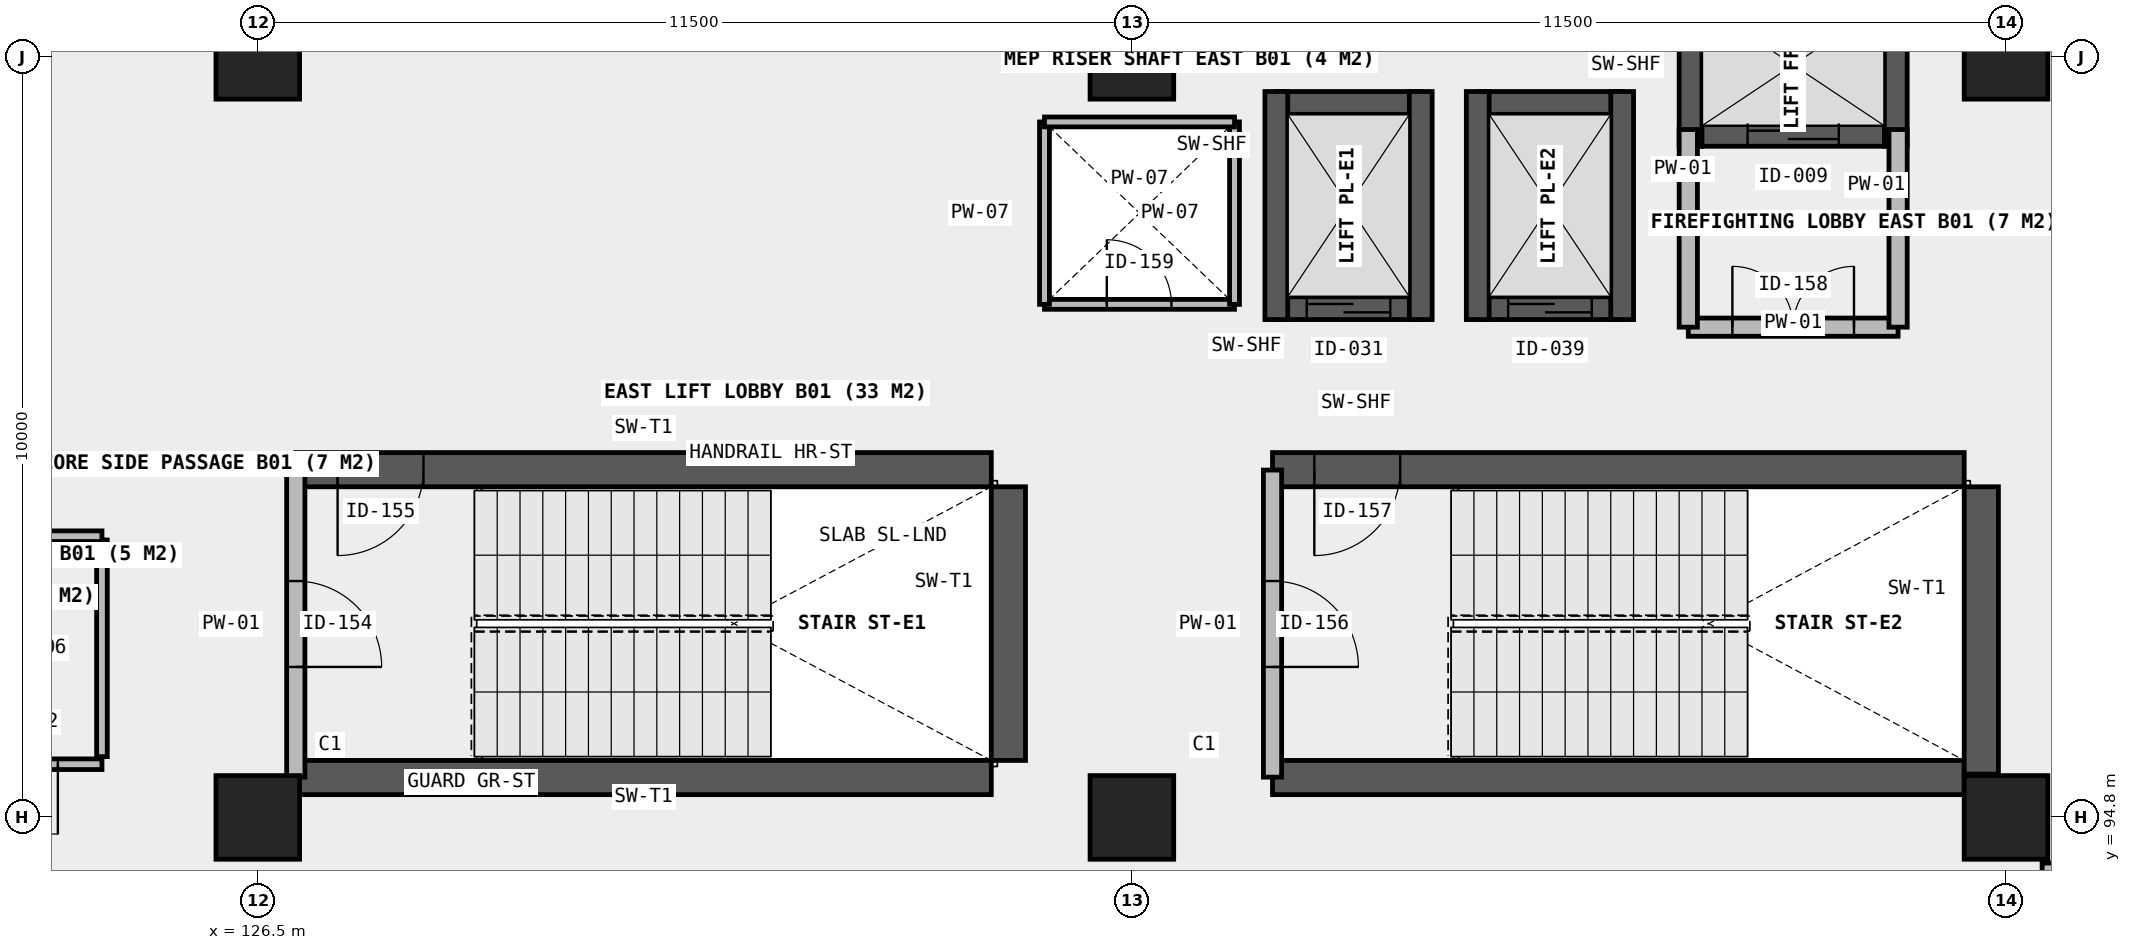
"""IFC4 building model, lengths in metres.
Left out: names, types, materials, properties, quantities, classifications, styles, units other than length and angle.
Written with IfcOpenShell. Run it as: python <this file> out.ifc"""

import sys

from ifc_helpers import new_model, si_unit, direction, frame, frame_2d, origin, origin_2d, place, context, subcontext, project, spatial, rectangle, extrude, element, fill, save


model = new_model("IFC4")
c1 = context("Model", 3, precision=1e-05, world=origin(), true_north=direction((0.0, 1.0)))
c2 = subcontext(c1, "Body", "Model", "MODEL_VIEW")
j1 = project(units=[si_unit("LENGTHUNIT", "METRE"), si_unit("PLANEANGLEUNIT", "RADIAN")], contexts=[c1])
p1 = place(None, origin())
s1 = spatial("IfcSite", under=j1, at=p1, CompositionType="ELEMENT")
p2 = place(p1, origin())
s2 = spatial("IfcBuilding", under=s1, at=p2, CompositionType="ELEMENT")
p3 = place(p2, frame((0.0, 0.0, -4.2)))
s3 = spatial("IfcBuildingStorey", under=s2, at=p3, CompositionType="ELEMENT", Elevation=-4.2)
for number, where, z_axis, x_axis in (
    (1, (126.5, 94.8, 0.0), (0.0, 0.0, 1.0), (1.0, 0.0, 0.0)),
    (2, (126.5, 104.8, 0.0), (0.0, 0.0, 1.0), (1.0, 0.0, 0.0)),
    (3, (138.0, 94.8, 0.0), (0.0, 0.0, 1.0), (1.0, 0.0, 0.0)),
    (4, (138.0, 104.8, 0.0), (0.0, 0.0, 1.0), (1.0, 0.0, 0.0)),
    (5, (149.5, 94.8, 0.0), (0.0, 0.0, 1.0), (1.0, 0.0, 0.0)),
    (6, (149.5, 104.8, 0.0), (0.0, 0.0, 1.0), (1.0, 0.0, 0.0)),
):
    element("IfcColumn", number, at=place(p3, frame(where, z_axis=z_axis, x_axis=x_axis)), inside=s3, PredefinedType="COLUMN", context=c2, shape_type="SweptSolid", body=[
        extrude(rectangle(XDim=1.1, YDim=1.1, at=origin_2d()), origin(), (0.0, 0.0, 1.0), 4.2),
    ])
p4 = place(p3, frame((145.35, 103.78, 0.0), z_axis=(0.0, 0.0, 1.0), x_axis=(1.0, 0.0, 0.0)))
e7 = element("IfcWall", 7, at=p4, inside=s3, PredefinedType="SHEAR", context=c2, shape_type="SweptSolid", body=[
    extrude(rectangle(XDim=2.7, YDim=0.3, at=frame_2d((1.35, 0.0))), origin(), (0.0, 0.0, 1.0), 4.2),
])
p5 = place(p4, frame((0.75, 0.0, 0.0)))
e8 = element("IfcOpeningElement", 8, at=p5, cuts=e7, PredefinedType="OPENING", context=c2, shape_type="SweptSolid", body=[
    extrude(rectangle(XDim=1.2, YDim=2.15, at=frame_2d((0.6, 1.075))), frame((0.0, 0.16, 0.0), z_axis=(0.0, -1.0, 0.0), x_axis=(1.0, 0.0, 0.0)), (0.0, 0.0, 1.0), 0.32),
])
for number, where, z_axis, x_axis in (
    (9, (145.35, 103.63, 0.0), (0.0, 0.0, 1.0), (0.0, 1.0, 0.0)),
    (10, (148.05, 103.63, 0.0), (0.0, 0.0, 1.0), (0.0, 1.0, 0.0)),
):
    element("IfcWall", number, at=place(p3, frame(where, z_axis=z_axis, x_axis=x_axis)), inside=s3, PredefinedType="SHEAR", context=c2, shape_type="SweptSolid", body=[
        extrude(rectangle(XDim=2.14, YDim=0.3, at=frame_2d((1.07, 0.0))), origin(), (0.0, 0.0, 1.0), 4.2),
    ])
p6 = place(p3, frame((139.9, 101.5, 0.0), z_axis=(0.0, 0.0, 1.0), x_axis=(1.0, 0.0, 0.0)))
e11 = element("IfcWall", 11, at=p6, inside=s3, PredefinedType="SHEAR", context=c2, shape_type="SweptSolid", body=[
    extrude(rectangle(XDim=1.9, YDim=0.3, at=frame_2d((0.95, 0.0))), origin(), (0.0, 0.0, 1.0), 4.2),
])
p7 = place(p6, frame((0.4, 0.0, 0.0)))
e12 = element("IfcOpeningElement", 12, at=p7, cuts=e11, PredefinedType="OPENING", context=c2, shape_type="SweptSolid", body=[
    extrude(rectangle(XDim=1.1, YDim=2.15, at=frame_2d((0.55, 1.075))), frame((0.0, 0.16, 0.0), z_axis=(0.0, -1.0, 0.0), x_axis=(1.0, 0.0, 0.0)), (0.0, 0.0, 1.0), 0.32),
])
p8 = place(p3, frame((139.9, 104.2, 0.0), z_axis=(0.0, 0.0, 1.0), x_axis=(1.0, 0.0, 0.0)))
e13 = element("IfcWall", 13, at=p8, inside=s3, PredefinedType="SHEAR", context=c2, shape_type="SweptSolid", body=[
    extrude(rectangle(XDim=1.9, YDim=0.3, at=frame_2d((0.95, 0.0))), origin(), (0.0, 0.0, 1.0), 4.2),
])
for number, where, z_axis, x_axis in (
    (14, (139.9, 101.35, 0.0), (0.0, 0.0, 1.0), (0.0, 1.0, 0.0)),
    (15, (141.8, 101.35, 0.0), (0.0, 0.0, 1.0), (0.0, 1.0, 0.0)),
):
    element("IfcWall", number, at=place(p3, frame(where, z_axis=z_axis, x_axis=x_axis)), inside=s3, PredefinedType="SHEAR", context=c2, shape_type="SweptSolid", body=[
        extrude(rectangle(XDim=3.0, YDim=0.3, at=frame_2d((1.5, 0.0))), origin(), (0.0, 0.0, 1.0), 4.2),
    ])
p9 = place(p3, frame((142.55, 101.5, 0.0), z_axis=(0.0, 0.0, 1.0), x_axis=(1.0, 0.0, 0.0)))
e16 = element("IfcWall", 16, at=p9, inside=s3, PredefinedType="SHEAR", context=c2, shape_type="SweptSolid", body=[
    extrude(rectangle(XDim=1.9, YDim=0.3, at=frame_2d((0.95, 0.0))), origin(), (0.0, 0.0, 1.0), 4.2),
])
p10 = place(p9, frame((0.4, 0.0, 0.0)))
e17 = element("IfcOpeningElement", 17, at=p10, cuts=e16, PredefinedType="OPENING", context=c2, shape_type="SweptSolid", body=[
    extrude(rectangle(XDim=1.1, YDim=2.15, at=frame_2d((0.55, 1.075))), frame((0.0, 0.16, 0.0), z_axis=(0.0, -1.0, 0.0), x_axis=(1.0, 0.0, 0.0)), (0.0, 0.0, 1.0), 0.32),
])
p11 = place(p3, frame((142.55, 104.2, 0.0), z_axis=(0.0, 0.0, 1.0), x_axis=(1.0, 0.0, 0.0)))
e18 = element("IfcWall", 18, at=p11, inside=s3, PredefinedType="SHEAR", context=c2, shape_type="SweptSolid", body=[
    extrude(rectangle(XDim=1.9, YDim=0.3, at=frame_2d((0.95, 0.0))), origin(), (0.0, 0.0, 1.0), 4.2),
])
for number, where, z_axis, x_axis in (
    (19, (142.55, 101.35, 0.0), (0.0, 0.0, 1.0), (0.0, 1.0, 0.0)),
    (20, (144.45, 101.35, 0.0), (0.0, 0.0, 1.0), (0.0, 1.0, 0.0)),
):
    element("IfcWall", number, at=place(p3, frame(where, z_axis=z_axis, x_axis=x_axis)), inside=s3, PredefinedType="SHEAR", context=c2, shape_type="SweptSolid", body=[
        extrude(rectangle(XDim=3.0, YDim=0.3, at=frame_2d((1.5, 0.0))), origin(), (0.0, 0.0, 1.0), 4.2),
    ])
p12 = place(p3, frame((127.0, 95.325, 0.0), z_axis=(0.0, 0.0, 1.0), x_axis=(1.0, 0.0, 0.0)))
e21 = element("IfcWall", 21, at=p12, inside=s3, PredefinedType="SHEAR", context=c2, shape_type="SweptSolid", body=[
    extrude(rectangle(XDim=9.15, YDim=0.45, at=frame_2d((4.575, 0.0))), origin(), (0.0, 0.0, 1.0), 4.2),
])
p13 = place(p3, frame((127.0, 99.375, 0.0), z_axis=(0.0, 0.0, 1.0), x_axis=(1.0, 0.0, 0.0)))
e22 = element("IfcWall", 22, at=p13, inside=s3, PredefinedType="SHEAR", context=c2, shape_type="SweptSolid", body=[
    extrude(rectangle(XDim=9.15, YDim=0.45, at=frame_2d((4.575, 0.0))), origin(), (0.0, 0.0, 1.0), 4.2),
])
p14 = place(p13, frame((0.55, 0.0, 0.0)))
e23 = element("IfcOpeningElement", 23, at=p14, cuts=e22, PredefinedType="OPENING", context=c2, shape_type="SweptSolid", body=[
    extrude(rectangle(XDim=1.13, YDim=2.15, at=frame_2d((0.565, 1.075))), frame((0.0, 0.235, 0.0), z_axis=(0.0, -1.0, 0.0), x_axis=(1.0, 0.0, 0.0)), (0.0, 0.0, 1.0), 0.47),
])
p15 = place(p3, frame((136.375, 95.55, 0.0), z_axis=(0.0, 0.0, 1.0), x_axis=(0.0, 1.0, 0.0)))
e24 = element("IfcWall", 24, at=p15, inside=s3, PredefinedType="SHEAR", context=c2, shape_type="SweptSolid", body=[
    extrude(rectangle(XDim=3.6, YDim=0.45, at=frame_2d((1.8, 0.0))), origin(), (0.0, 0.0, 1.0), 4.2),
])
p16 = place(p3, frame((139.85, 95.325, 0.0), z_axis=(0.0, 0.0, 1.0), x_axis=(1.0, 0.0, 0.0)))
e25 = element("IfcWall", 25, at=p16, inside=s3, PredefinedType="SHEAR", context=c2, shape_type="SweptSolid", body=[
    extrude(rectangle(XDim=9.1, YDim=0.45, at=frame_2d((4.55, 0.0))), origin(), (0.0, 0.0, 1.0), 4.2),
])
p17 = place(p3, frame((139.85, 99.375, 0.0), z_axis=(0.0, 0.0, 1.0), x_axis=(1.0, 0.0, 0.0)))
e26 = element("IfcWall", 26, at=p17, inside=s3, PredefinedType="SHEAR", context=c2, shape_type="SweptSolid", body=[
    extrude(rectangle(XDim=9.1, YDim=0.45, at=frame_2d((4.55, 0.0))), origin(), (0.0, 0.0, 1.0), 4.2),
])
p18 = place(p17, frame((0.55, 0.0, 0.0)))
e27 = element("IfcOpeningElement", 27, at=p18, cuts=e26, PredefinedType="OPENING", context=c2, shape_type="SweptSolid", body=[
    extrude(rectangle(XDim=1.13, YDim=2.15, at=frame_2d((0.565, 1.075))), frame((0.0, 0.235, 0.0), z_axis=(0.0, -1.0, 0.0), x_axis=(1.0, 0.0, 0.0)), (0.0, 0.0, 1.0), 0.47),
])
p19 = place(p3, frame((149.175, 95.37, 0.0), z_axis=(0.0, 0.0, 1.0), x_axis=(0.0, 1.0, 0.0)))
e28 = element("IfcWall", 28, at=p19, inside=s3, PredefinedType="SHEAR", context=c2, shape_type="SweptSolid", body=[
    extrude(rectangle(XDim=3.78, YDim=0.45, at=frame_2d((1.89, 0.0))), origin(), (0.0, 0.0, 1.0), 4.2),
])
p20 = place(p3, frame((127.0, 95.33, 0.0), z_axis=(0.0, 0.0, 1.0), x_axis=(0.0, 1.0, 0.0)))
e29 = element("IfcWall", 29, at=p20, inside=s3, PredefinedType="SOLIDWALL", context=c2, shape_type="SweptSolid", body=[
    extrude(rectangle(XDim=4.04, YDim=0.24, at=frame_2d((2.02, 0.0))), origin(), (0.0, 0.0, 1.0), 3.86),
])
p21 = place(p20, frame((1.45, 0.0, 0.0)))
e30 = element("IfcOpeningElement", 30, at=p21, cuts=e29, PredefinedType="OPENING", context=c2, shape_type="SweptSolid", body=[
    extrude(rectangle(XDim=1.13, YDim=2.15, at=frame_2d((0.565, 1.075))), frame((0.0, 0.13, 0.0), z_axis=(0.0, -1.0, 0.0), x_axis=(1.0, 0.0, 0.0)), (0.0, 0.0, 1.0), 0.26),
])
p22 = place(p3, frame((139.85, 95.33, 0.0), z_axis=(0.0, 0.0, 1.0), x_axis=(0.0, 1.0, 0.0)))
e31 = element("IfcWall", 31, at=p22, inside=s3, PredefinedType="SOLIDWALL", context=c2, shape_type="SweptSolid", body=[
    extrude(rectangle(XDim=4.04, YDim=0.24, at=frame_2d((2.02, 0.0))), origin(), (0.0, 0.0, 1.0), 3.86),
])
p23 = place(p22, frame((1.45, 0.0, 0.0)))
e32 = element("IfcOpeningElement", 32, at=p23, cuts=e31, PredefinedType="OPENING", context=c2, shape_type="SweptSolid", body=[
    extrude(rectangle(XDim=1.13, YDim=2.15, at=frame_2d((0.565, 1.075))), frame((0.0, 0.13, 0.0), z_axis=(0.0, -1.0, 0.0), x_axis=(1.0, 0.0, 0.0)), (0.0, 0.0, 1.0), 0.26),
])
p24 = place(p3, frame((145.32, 101.25, 0.0), z_axis=(0.0, 0.0, 1.0), x_axis=(1.0, 0.0, 0.0)))
e33 = element("IfcWall", 33, at=p24, inside=s3, PredefinedType="SOLIDWALL", context=c2, shape_type="SweptSolid", body=[
    extrude(rectangle(XDim=2.76, YDim=0.24, at=frame_2d((1.38, 0.0))), origin(), (0.0, 0.0, 1.0), 3.86),
])
p25 = place(p24, frame((0.58, 0.0, 0.0)))
e34 = element("IfcOpeningElement", 34, at=p25, cuts=e33, PredefinedType="OPENING", context=c2, shape_type="SweptSolid", body=[
    extrude(rectangle(XDim=1.6, YDim=2.15, at=frame_2d((0.8, 1.075))), frame((0.0, 0.13, 0.0), z_axis=(0.0, -1.0, 0.0), x_axis=(1.0, 0.0, 0.0)), (0.0, 0.0, 1.0), 0.26),
])
for number, where, z_axis, x_axis in (
    (35, (145.32, 101.25, 0.0), (0.0, 0.0, 1.0), (0.0, 1.0, 0.0)),
    (36, (148.08, 101.25, 0.0), (0.0, 0.0, 1.0), (0.0, 1.0, 0.0)),
):
    element("IfcWall", number, at=place(p3, frame(where, z_axis=z_axis, x_axis=x_axis)), inside=s3, PredefinedType="SOLIDWALL", context=c2, shape_type="SweptSolid", body=[
        extrude(rectangle(XDim=2.6, YDim=0.24, at=frame_2d((1.3, 0.0))), origin(), (0.0, 0.0, 1.0), 3.86),
    ])
p26 = place(p3, frame((136.85, 101.55, 0.0), z_axis=(0.0, 0.0, 1.0), x_axis=(1.0, 0.0, 0.0)))
e37 = element("IfcWall", 37, at=p26, inside=s3, PredefinedType="PLUMBINGWALL", context=c2, shape_type="SweptSolid", body=[
    extrude(rectangle(XDim=2.5, YDim=0.13, at=frame_2d((1.25, 0.0))), origin(), (0.0, 0.0, 1.0), 3.86),
])
p27 = place(p26, frame((0.82, 0.0, 0.0)))
e38 = element("IfcOpeningElement", 38, at=p27, cuts=e37, PredefinedType="OPENING", context=c2, shape_type="SweptSolid", body=[
    extrude(rectangle(XDim=0.85, YDim=2.0, at=frame_2d((0.425, 1.0))), frame((0.0, 0.075, 0.0), z_axis=(0.0, -1.0, 0.0), x_axis=(1.0, 0.0, 0.0)), (0.0, 0.0, 1.0), 0.15),
])
for number, where, z_axis, x_axis in (
    (39, (136.85, 101.55, 0.0), (0.0, 0.0, 1.0), (0.0, 1.0, 0.0)),
    (40, (139.35, 101.55, 0.0), (0.0, 0.0, 1.0), (0.0, 1.0, 0.0)),
):
    element("IfcWall", number, at=place(p3, frame(where, z_axis=z_axis, x_axis=x_axis)), inside=s3, PredefinedType="PLUMBINGWALL", context=c2, shape_type="SweptSolid", body=[
        extrude(rectangle(XDim=2.4, YDim=0.13, at=frame_2d((1.2, 0.0))), origin(), (0.0, 0.0, 1.0), 3.86),
    ])
p28 = place(p3, frame((136.85, 103.95, 0.0), z_axis=(0.0, 0.0, 1.0), x_axis=(1.0, 0.0, 0.0)))
e41 = element("IfcWall", 41, at=p28, inside=s3, PredefinedType="PLUMBINGWALL", context=c2, shape_type="SweptSolid", body=[
    extrude(rectangle(XDim=2.5, YDim=0.13, at=frame_2d((1.25, 0.0))), origin(), (0.0, 0.0, 1.0), 3.86),
])
p29 = place(p3, frame((118.15, 95.5, 0.0), z_axis=(0.0, 0.0, 1.0), x_axis=(1.0, 0.0, 0.0)))
e42 = element("IfcWall", 42, at=p29, inside=s3, PredefinedType="PLUMBINGWALL", context=c2, shape_type="SweptSolid", body=[
    extrude(rectangle(XDim=6.3, YDim=0.14, at=frame_2d((3.15, 0.0))), origin(), (0.0, 0.0, 1.0), 3.86),
])
p30 = place(p29, frame((0.72, 0.0, 0.0)))
e43 = element("IfcOpeningElement", 43, at=p30, cuts=e42, PredefinedType="OPENING", context=c2, shape_type="SweptSolid", body=[
    extrude(rectangle(XDim=0.95, YDim=2.1, at=frame_2d((0.475, 1.05))), frame((0.0, 0.08, 0.0), z_axis=(0.0, -1.0, 0.0), x_axis=(1.0, 0.0, 0.0)), (0.0, 0.0, 1.0), 0.16),
])
p31 = place(p29, frame((2.8, 0.0, 0.0)))
e44 = element("IfcOpeningElement", 44, at=p31, cuts=e42, PredefinedType="OPENING", context=c2, shape_type="SweptSolid", body=[
    extrude(rectangle(XDim=0.92, YDim=2.1, at=frame_2d((0.46, 1.05))), frame((0.0, 0.08, 0.0), z_axis=(0.0, -1.0, 0.0), x_axis=(1.0, 0.0, 0.0)), (0.0, 0.0, 1.0), 0.16),
])
p32 = place(p29, frame((4.8, 0.0, 0.0)))
e45 = element("IfcOpeningElement", 45, at=p32, cuts=e42, PredefinedType="OPENING", context=c2, shape_type="SweptSolid", body=[
    extrude(rectangle(XDim=0.92, YDim=2.1, at=frame_2d((0.46, 1.05))), frame((0.0, 0.08, 0.0), z_axis=(0.0, -1.0, 0.0), x_axis=(1.0, 0.0, 0.0)), (0.0, 0.0, 1.0), 0.16),
])
p33 = place(p3, frame((124.45, 95.6, 0.0), z_axis=(0.0, 0.0, 1.0), x_axis=(0.0, 1.0, 0.0)))
e46 = element("IfcWall", 46, at=p33, inside=s3, PredefinedType="PLUMBINGWALL", context=c2, shape_type="SweptSolid", body=[
    extrude(rectangle(XDim=2.85, YDim=0.14, at=frame_2d((1.425, 0.0))), origin(), (0.0, 0.0, 1.0), 3.86),
])
p34 = place(p3, frame((118.15, 98.5, 0.0), z_axis=(0.0, 0.0, 1.0), x_axis=(1.0, 0.0, 0.0)))
e47 = element("IfcWall", 47, at=p34, inside=s3, PredefinedType="PLUMBINGWALL", context=c2, shape_type="SweptSolid", body=[
    extrude(rectangle(XDim=6.3, YDim=0.14, at=frame_2d((3.15, 0.0))), origin(), (0.0, 0.0, 1.0), 3.86),
])
p35 = place(p3, frame((150.1, 86.2, 0.0), z_axis=(0.0, 0.0, 1.0), x_axis=(0.0, 1.0, 0.0)))
e48 = element("IfcWall", 48, at=p35, inside=s3, PredefinedType="SOLIDWALL", context=c2, shape_type="SweptSolid", body=[
    extrude(rectangle(XDim=8.0, YDim=0.25, at=frame_2d((4.0, 0.0))), origin(), (0.0, 0.0, 1.0), 3.86),
])
p36 = place(p35, frame((2.8, 0.0, 0.0)))
e49 = element("IfcOpeningElement", 49, at=p36, cuts=e48, PredefinedType="OPENING", context=c2, shape_type="SweptSolid", body=[
    extrude(rectangle(XDim=1.7, YDim=2.25, at=frame_2d((0.85, 1.125))), frame((0.0, 0.135, 0.0), z_axis=(0.0, -1.0, 0.0), x_axis=(1.0, 0.0, 0.0)), (0.0, 0.0, 1.0), 0.27),
])
p37 = place(p5, origin())
e50 = element("IfcDoor", 50, at=p37, inside=s3, OperationType="SLIDING_TO_RIGHT", PredefinedType="DOOR", context=c2, shape_type="SweptSolid", body=[
    extrude(rectangle(XDim=1.2, YDim=2.15, at=frame_2d((0.6, 1.075))), frame((0.0, 0.025, 0.0), z_axis=(0.0, -1.0, 0.0), x_axis=(1.0, 0.0, 0.0)), (0.0, 0.0, 1.0), 0.05),
])
fill(e8, e50)
p38 = place(p7, origin())
e51 = element("IfcDoor", 51, at=p38, inside=s3, OperationType="SLIDING_TO_LEFT", PredefinedType="DOOR", context=c2, shape_type="SweptSolid", body=[
    extrude(rectangle(XDim=1.1, YDim=2.15, at=frame_2d((0.55, 1.075))), frame((0.0, 0.025, 0.0), z_axis=(0.0, -1.0, 0.0), x_axis=(1.0, 0.0, 0.0)), (0.0, 0.0, 1.0), 0.05),
])
fill(e12, e51)
p39 = place(p10, origin())
e52 = element("IfcDoor", 52, at=p39, inside=s3, OperationType="SLIDING_TO_LEFT", PredefinedType="DOOR", context=c2, shape_type="SweptSolid", body=[
    extrude(rectangle(XDim=1.1, YDim=2.15, at=frame_2d((0.55, 1.075))), frame((0.0, 0.025, 0.0), z_axis=(0.0, -1.0, 0.0), x_axis=(1.0, 0.0, 0.0)), (0.0, 0.0, 1.0), 0.05),
])
fill(e17, e52)
p40 = place(p21, frame((0.565, 0.0, 0.0), z_axis=(0.0, 0.0, 1.0), x_axis=(-1.0, 0.0, 0.0)))
e53 = element("IfcDoor", 53, at=p40, inside=s3, OperationType="SINGLE_SWING_LEFT", PredefinedType="DOOR", context=c2, shape_type="SweptSolid", body=[
    extrude(rectangle(XDim=1.13, YDim=2.15, at=frame_2d((0.0, 1.075))), frame((0.0, 0.025, 0.0), z_axis=(0.0, -1.0, 0.0), x_axis=(1.0, 0.0, 0.0)), (0.0, 0.0, 1.0), 0.05),
])
fill(e30, e53)
p41 = place(p14, frame((0.565, 0.0, 0.0), z_axis=(0.0, 0.0, 1.0), x_axis=(-1.0, 0.0, 0.0)))
e54 = element("IfcDoor", 54, at=p41, inside=s3, OperationType="SINGLE_SWING_LEFT", PredefinedType="DOOR", context=c2, shape_type="SweptSolid", body=[
    extrude(rectangle(XDim=1.13, YDim=2.15, at=frame_2d((0.0, 1.075))), frame((0.0, 0.025, 0.0), z_axis=(0.0, -1.0, 0.0), x_axis=(1.0, 0.0, 0.0)), (0.0, 0.0, 1.0), 0.05),
])
fill(e23, e54)
p42 = place(p23, frame((0.565, 0.0, 0.0), z_axis=(0.0, 0.0, 1.0), x_axis=(-1.0, 0.0, 0.0)))
e55 = element("IfcDoor", 55, at=p42, inside=s3, OperationType="SINGLE_SWING_LEFT", PredefinedType="DOOR", context=c2, shape_type="SweptSolid", body=[
    extrude(rectangle(XDim=1.13, YDim=2.15, at=frame_2d((0.0, 1.075))), frame((0.0, 0.025, 0.0), z_axis=(0.0, -1.0, 0.0), x_axis=(1.0, 0.0, 0.0)), (0.0, 0.0, 1.0), 0.05),
])
fill(e32, e55)
p43 = place(p18, frame((0.565, 0.0, 0.0), z_axis=(0.0, 0.0, 1.0), x_axis=(-1.0, 0.0, 0.0)))
e56 = element("IfcDoor", 56, at=p43, inside=s3, OperationType="SINGLE_SWING_LEFT", PredefinedType="DOOR", context=c2, shape_type="SweptSolid", body=[
    extrude(rectangle(XDim=1.13, YDim=2.15, at=frame_2d((0.0, 1.075))), frame((0.0, 0.025, 0.0), z_axis=(0.0, -1.0, 0.0), x_axis=(1.0, 0.0, 0.0)), (0.0, 0.0, 1.0), 0.05),
])
fill(e27, e56)
p44 = place(p25, origin())
e57 = element("IfcDoor", 57, at=p44, inside=s3, OperationType="DOUBLE_DOOR_SINGLE_SWING", PredefinedType="DOOR", context=c2, shape_type="SweptSolid", body=[
    extrude(rectangle(XDim=1.6, YDim=2.15, at=frame_2d((0.8, 1.075))), frame((0.0, 0.025, 0.0), z_axis=(0.0, -1.0, 0.0), x_axis=(1.0, 0.0, 0.0)), (0.0, 0.0, 1.0), 0.05),
])
fill(e34, e57)
p45 = place(p27, origin())
e58 = element("IfcDoor", 58, at=p45, inside=s3, OperationType="SINGLE_SWING_LEFT", PredefinedType="TRAPDOOR", context=c2, shape_type="SweptSolid", body=[
    extrude(rectangle(XDim=0.85, YDim=2.0, at=frame_2d((0.425, 1.0))), frame((0.0, 0.025, 0.0), z_axis=(0.0, -1.0, 0.0), x_axis=(1.0, 0.0, 0.0)), (0.0, 0.0, 1.0), 0.05),
])
fill(e38, e58)
p46 = place(p32, origin())
e59 = element("IfcDoor", 59, at=p46, inside=s3, OperationType="SINGLE_SWING_RIGHT", PredefinedType="DOOR", context=c2, shape_type="SweptSolid", body=[
    extrude(rectangle(XDim=0.92, YDim=2.1, at=frame_2d((0.46, 1.05))), frame((0.0, 0.025, 0.0), z_axis=(0.0, -1.0, 0.0), x_axis=(1.0, 0.0, 0.0)), (0.0, 0.0, 1.0), 0.05),
])
fill(e45, e59)
save(model, sys.argv[1])
